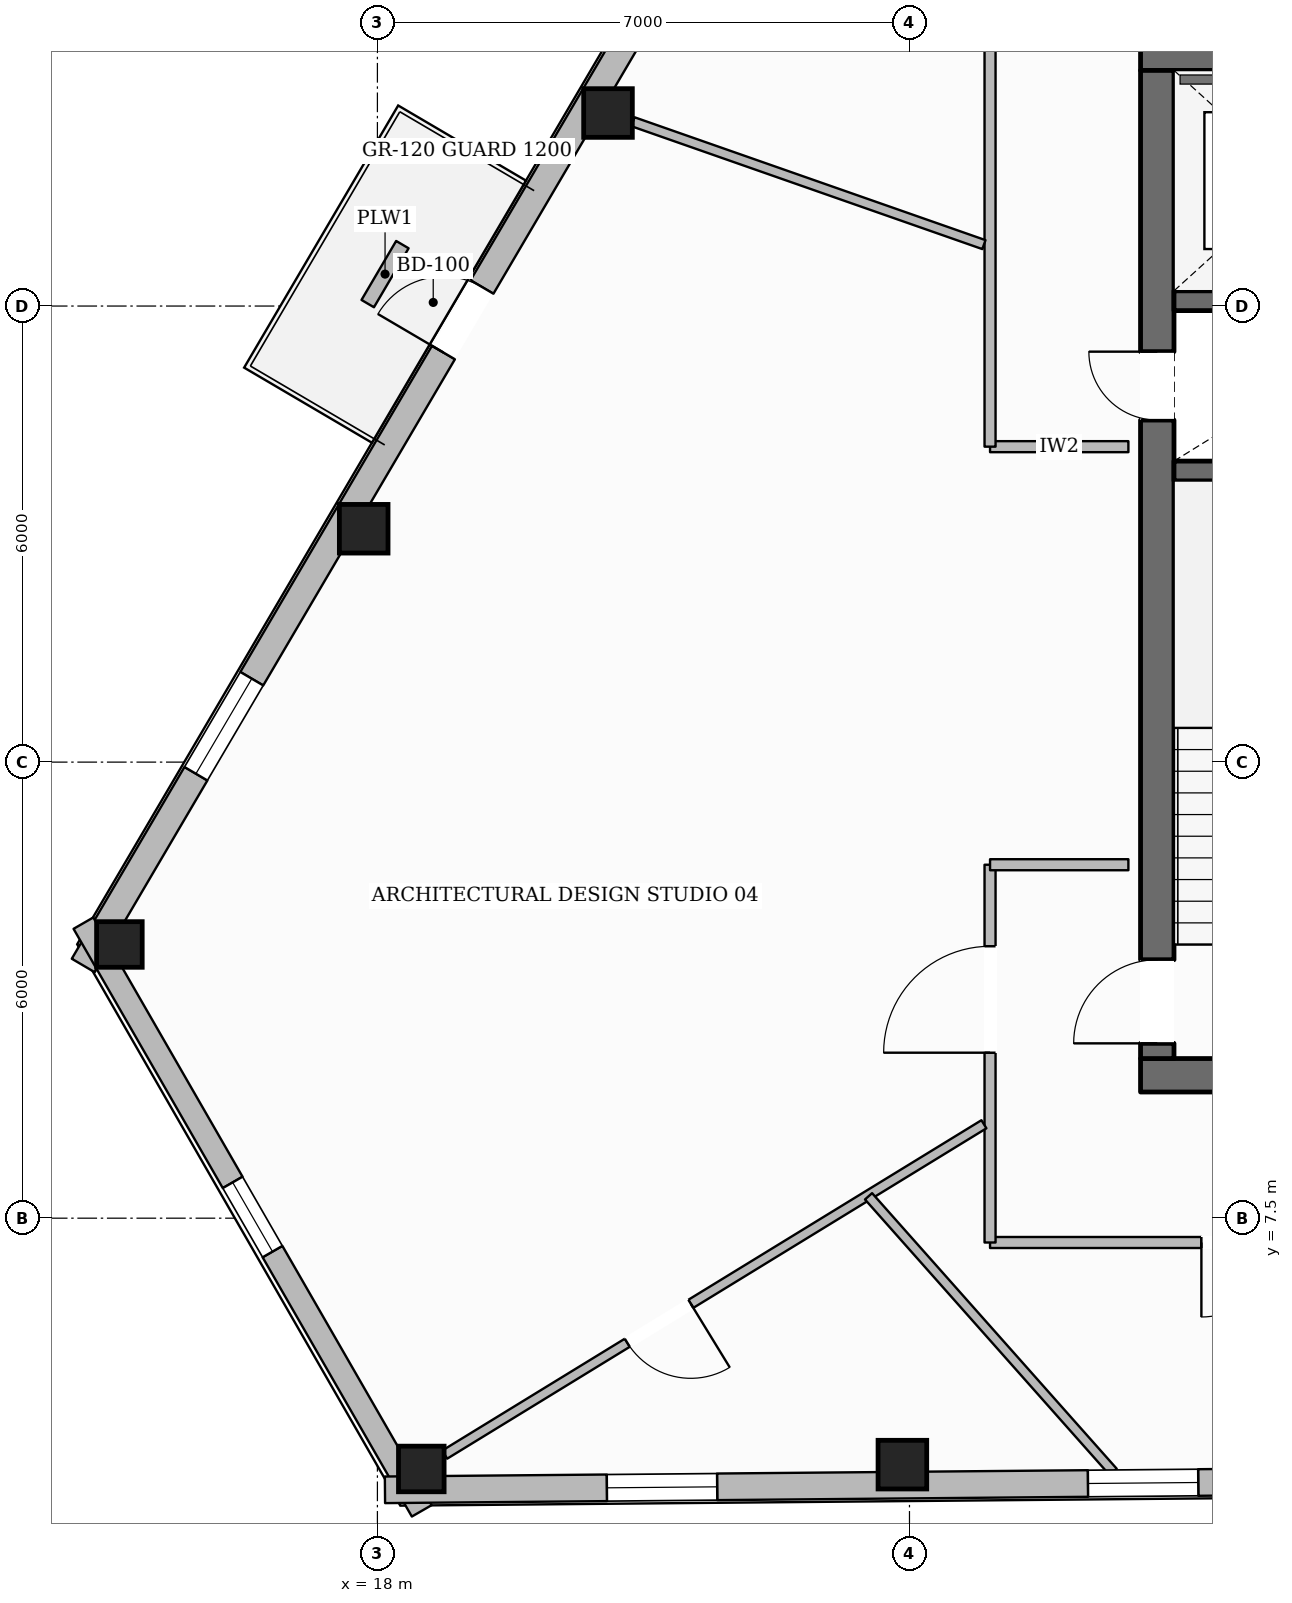
"""IFC4 building model, lengths in metres.
Left out: names, types, materials, properties, quantities, classifications, styles, units other than length and angle.
Written with IfcOpenShell. Run it as: python <this file> out.ifc"""

import sys

from ifc_helpers import new_model, si_unit, direction, frame, frame_2d, origin, origin_2d, place, context, subcontext, project, spatial, rectangle, hollow_rectangle, extrude, element, fill, save


model = new_model("IFC4")
c1 = context("Model", 3, precision=1e-05, world=origin(), true_north=direction((0.0, 1.0)))
c2 = subcontext(c1, "Body", "Model", "MODEL_VIEW")
j1 = project(units=[si_unit("LENGTHUNIT", "METRE"), si_unit("PLANEANGLEUNIT", "RADIAN")], contexts=[c1])
p1 = place(None, origin())
s1 = spatial("IfcSite", under=j1, at=p1, CompositionType="ELEMENT")
p2 = place(p1, origin())
s2 = spatial("IfcBuilding", under=s1, at=p2, CompositionType="ELEMENT")
p3 = place(p2, frame((0.0, 0.0, 215.05)))
s3 = spatial("IfcBuildingStorey", under=s2, at=p3, CompositionType="ELEMENT", Elevation=215.05)
p4 = place(p3, frame((28.04, 9.38, 0.0), z_axis=(0.0, 0.0, 1.0), x_axis=(1.0, 0.0, 0.0)))
e1 = element("IfcWall", 1, at=p4, inside=s3, PredefinedType="SOLIDWALL", context=c2, shape_type="SweptSolid", body=[
    extrude(rectangle(XDim=19.92, YDim=0.44, at=frame_2d((9.96, 0.0))), origin(), (0.0, 0.0, 1.0), 3.6),
])
p5 = place(p4, frame((10.46, 0.0, 0.0)))
e2 = element("IfcOpeningElement", 2, at=p5, cuts=e1, PredefinedType="OPENING", context=c2, shape_type="SweptSolid", body=[
    extrude(rectangle(XDim=1.4, YDim=2.2, at=frame_2d((0.7, 1.1))), frame((0.0, 0.23, 0.0), z_axis=(0.0, -1.0, 0.0), x_axis=(1.0, 0.0, 0.0)), (0.0, 0.0, 1.0), 0.46),
])
p6 = place(p3, frame((28.04, 22.82, 0.0), z_axis=(0.0, 0.0, 1.0), x_axis=(1.0, 0.0, 0.0)))
e3 = element("IfcWall", 3, at=p6, inside=s3, PredefinedType="SOLIDWALL", context=c2, shape_type="SweptSolid", body=[
    extrude(rectangle(XDim=19.92, YDim=0.44, at=frame_2d((9.96, 0.0))), origin(), (0.0, 0.0, 1.0), 3.6),
])
p7 = place(p6, frame((6.235, 0.0, 0.0)))
e4 = element("IfcOpeningElement", 4, at=p7, cuts=e3, PredefinedType="OPENING", context=c2, shape_type="SweptSolid", body=[
    extrude(rectangle(XDim=1.05, YDim=2.15, at=frame_2d((0.525, 1.075))), frame((0.0, 0.23, 0.0), z_axis=(0.0, -1.0, 0.0), x_axis=(1.0, 0.0, 0.0)), (0.0, 0.0, 1.0), 0.46),
])
p8 = place(p6, frame((12.635, 0.0, 0.0)))
e5 = element("IfcOpeningElement", 5, at=p8, cuts=e3, PredefinedType="OPENING", context=c2, shape_type="SweptSolid", body=[
    extrude(rectangle(XDim=1.05, YDim=2.15, at=frame_2d((0.525, 1.075))), frame((0.0, 0.23, 0.0), z_axis=(0.0, -1.0, 0.0), x_axis=(1.0, 0.0, 0.0)), (0.0, 0.0, 1.0), 0.46),
])
p9 = place(p3, frame((28.26, 9.6, 0.0), z_axis=(0.0, 0.0, 1.0), x_axis=(0.0, 1.0, 0.0)))
e6 = element("IfcWall", 6, at=p9, inside=s3, PredefinedType="SOLIDWALL", context=c2, shape_type="SweptSolid", body=[
    extrude(rectangle(XDim=13.0, YDim=0.44, at=frame_2d((6.5, 0.0))), origin(), (0.0, 0.0, 1.0), 3.6),
])
p10 = place(p9, frame((0.2, 0.0, 0.0)))
e7 = element("IfcOpeningElement", 7, at=p10, cuts=e6, PredefinedType="OPENING", context=c2, shape_type="SweptSolid", body=[
    extrude(rectangle(XDim=1.1, YDim=2.15, at=frame_2d((0.55, 1.075))), frame((0.0, 0.23, 0.0), z_axis=(0.0, -1.0, 0.0), x_axis=(1.0, 0.0, 0.0)), (0.0, 0.0, 1.0), 0.46),
])
p11 = place(p9, frame((8.4, 0.0, 0.0)))
e8 = element("IfcOpeningElement", 8, at=p11, cuts=e6, PredefinedType="OPENING", context=c2, shape_type="SweptSolid", body=[
    extrude(rectangle(XDim=0.9, YDim=2.1, at=frame_2d((0.45, 1.05))), frame((0.0, 0.23, 0.0), z_axis=(0.0, -1.0, 0.0), x_axis=(1.0, 0.0, 0.0)), (0.0, 0.0, 1.0), 0.46),
])
for number, where, z_axis, x_axis in (
    (9, (28.48, 17.33, 0.0), (0.0, 0.0, 1.0), (1.0, 0.0, 0.0)),
    (10, (28.48, 19.57, 0.0), (0.0, 0.0, 1.0), (1.0, 0.0, 0.0)),
):
    element("IfcWall", number, at=place(p3, frame(where, z_axis=z_axis, x_axis=x_axis)), inside=s3, PredefinedType="SHEAR", context=c2, shape_type="SweptSolid", body=[
        extrude(rectangle(XDim=3.2, YDim=0.26, at=frame_2d((1.6, 0.0))), origin(), (0.0, 0.0, 1.0), 3.6),
    ])
for number, where, z_axis, x_axis in (
    (11, (21.034, 22.04, 0.0), (0.0, 0.0, 1.0), (1.0, 0.0, 0.0)),
    (12, (17.82, 16.57, 0.0), (0.0, 0.0, 1.0), (1.0, 0.0, 0.0)),
):
    element("IfcColumn", number, at=place(p3, frame(where, z_axis=z_axis, x_axis=x_axis)), inside=s3, PredefinedType="COLUMN", context=c2, shape_type="SweptSolid", body=[
        extrude(hollow_rectangle(XDim=0.64, YDim=0.64, WallThickness=0.028, at=origin_2d()), origin(), (0.0, 0.0, 1.0), 3.6),
    ])
for number, where, z_axis, x_axis in (
    (13, (14.605, 11.101, 0.0), (0.0, 0.0, 1.0), (1.0, 0.0, 0.0)),
    (14, (18.577, 4.201, 0.0), (0.0, 0.0, 1.0), (1.0, 0.0, 0.0)),
):
    element("IfcColumn", number, at=place(p3, frame(where, z_axis=z_axis, x_axis=x_axis)), inside=s3, PredefinedType="COLUMN", context=c2, shape_type="SweptSolid", body=[
        extrude(hollow_rectangle(XDim=0.6, YDim=0.6, WallThickness=0.028, at=origin_2d()), origin(), (0.0, 0.0, 1.0), 3.6),
    ])
p12 = place(p3, frame((24.907, 4.258, 0.0), z_axis=(0.0, 0.0, 1.0), x_axis=(1.0, 0.0, 0.0)))
e15 = element("IfcColumn", 15, at=p12, inside=s3, PredefinedType="COLUMN", context=c2, shape_type="SweptSolid", body=[
    extrude(hollow_rectangle(XDim=0.64, YDim=0.64, WallThickness=0.028, at=origin_2d()), origin(), (0.0, 0.0, 1.0), 3.6),
])
p13 = place(p3, frame((14.13, 10.825, 0.0), z_axis=(0.0, 0.0, 1.0), x_axis=(0.506658543763, 0.862146808863, 0.0)))
e16 = element("IfcWall", 16, at=p13, inside=s3, PredefinedType="STANDARD", context=c2, shape_type="SweptSolid", body=[
    extrude(rectangle(XDim=39.014, YDim=0.35, at=frame_2d((19.507, 0.0))), origin(), (0.0, 0.0, 1.0), 3.132),
])
p14 = place(p13, frame((9.354, 0.0, 0.0)))
e17 = element("IfcOpeningElement", 17, at=p14, cuts=e16, PredefinedType="OPENING", context=c2, shape_type="SweptSolid", body=[
    extrude(rectangle(XDim=1.0, YDim=2.2, at=frame_2d((0.5, 1.1))), frame((0.0, 0.185, 0.0), z_axis=(0.0, -1.0, 0.0), x_axis=(1.0, 0.0, 0.0)), (0.0, 0.0, 1.0), 0.37),
])
p15 = place(p13, frame((34.645, 0.0, 0.65)))
e18 = element("IfcOpeningElement", 18, at=p15, cuts=e16, PredefinedType="OPENING", context=c2, shape_type="SweptSolid", body=[
    extrude(rectangle(XDim=1.45, YDim=1.75, at=frame_2d((0.725, 0.875))), frame((0.0, 0.185, 0.0), z_axis=(0.0, -1.0, 0.0), x_axis=(1.0, 0.0, 0.0)), (0.0, 0.0, 1.0), 0.37),
])
p16 = place(p13, frame((28.301, 0.0, 0.65)))
e19 = element("IfcOpeningElement", 19, at=p16, cuts=e16, PredefinedType="OPENING", context=c2, shape_type="SweptSolid", body=[
    extrude(rectangle(XDim=1.45, YDim=1.75, at=frame_2d((0.725, 0.875))), frame((0.0, 0.185, 0.0), z_axis=(0.0, -1.0, 0.0), x_axis=(1.0, 0.0, 0.0)), (0.0, 0.0, 1.0), 0.37),
])
p17 = place(p13, frame((21.958, 0.0, 0.65)))
e20 = element("IfcOpeningElement", 20, at=p17, cuts=e16, PredefinedType="OPENING", context=c2, shape_type="SweptSolid", body=[
    extrude(rectangle(XDim=1.45, YDim=1.75, at=frame_2d((0.725, 0.875))), frame((0.0, 0.185, 0.0), z_axis=(0.0, -1.0, 0.0), x_axis=(1.0, 0.0, 0.0)), (0.0, 0.0, 1.0), 0.37),
])
p18 = place(p13, frame((2.926, 0.0, 0.65)))
e21 = element("IfcOpeningElement", 21, at=p18, cuts=e16, PredefinedType="OPENING", context=c2, shape_type="SweptSolid", body=[
    extrude(rectangle(XDim=1.45, YDim=1.75, at=frame_2d((0.725, 0.875))), frame((0.0, 0.185, 0.0), z_axis=(0.0, -1.0, 0.0), x_axis=(1.0, 0.0, 0.0)), (0.0, 0.0, 1.0), 0.37),
])
p19 = place(p3, frame((18.583, 3.65, 0.0), z_axis=(0.0, 0.0, 1.0), x_axis=(-0.498897804032, 0.866660822428, 0.0)))
e22 = element("IfcWall", 22, at=p19, inside=s3, PredefinedType="STANDARD", context=c2, shape_type="SweptSolid", body=[
    extrude(rectangle(XDim=8.922, YDim=0.3, at=frame_2d((4.461, 0.0))), origin(), (0.0, 0.0, 1.0), 3.132),
])
p20 = place(p19, frame((3.936, 0.0, 0.65)))
e23 = element("IfcOpeningElement", 23, at=p20, cuts=e22, PredefinedType="OPENING", context=c2, shape_type="SweptSolid", body=[
    extrude(rectangle(XDim=1.05, YDim=1.7, at=frame_2d((0.525, 0.85))), frame((0.0, 0.16, 0.0), z_axis=(0.0, -1.0, 0.0), x_axis=(1.0, 0.0, 0.0)), (0.0, 0.0, 1.0), 0.32),
])
p21 = place(p3, frame((57.027, 4.277, 0.0), z_axis=(0.0, 0.0, 1.0), x_axis=(-0.999959560683, -0.008993163978, 0.0)))
e24 = element("IfcWall", 24, at=p21, inside=s3, PredefinedType="STANDARD", context=c2, shape_type="SweptSolid", body=[
    extrude(rectangle(XDim=38.929, YDim=0.35, at=frame_2d((19.465, 0.0))), origin(), (0.0, 0.0, 1.0), 3.132),
])
p22 = place(p21, frame((9.332, 0.0, 0.0)))
e25 = element("IfcOpeningElement", 25, at=p22, cuts=e24, PredefinedType="OPENING", context=c2, shape_type="SweptSolid", body=[
    extrude(rectangle(XDim=1.0, YDim=2.2, at=frame_2d((0.5, 1.1))), frame((0.0, 0.185, 0.0), z_axis=(0.0, -1.0, 0.0), x_axis=(1.0, 0.0, 0.0)), (0.0, 0.0, 1.0), 0.37),
])
p23 = place(p21, frame((34.559, 0.0, 0.65)))
e26 = element("IfcOpeningElement", 26, at=p23, cuts=e24, PredefinedType="OPENING", context=c2, shape_type="SweptSolid", body=[
    extrude(rectangle(XDim=1.45, YDim=1.75, at=frame_2d((0.725, 0.875))), frame((0.0, 0.185, 0.0), z_axis=(0.0, -1.0, 0.0), x_axis=(1.0, 0.0, 0.0)), (0.0, 0.0, 1.0), 0.37),
])
p24 = place(p21, frame((28.229, 0.0, 0.65)))
e27 = element("IfcOpeningElement", 27, at=p24, cuts=e24, PredefinedType="OPENING", context=c2, shape_type="SweptSolid", body=[
    extrude(rectangle(XDim=1.45, YDim=1.75, at=frame_2d((0.725, 0.875))), frame((0.0, 0.185, 0.0), z_axis=(0.0, -1.0, 0.0), x_axis=(1.0, 0.0, 0.0)), (0.0, 0.0, 1.0), 0.37),
])
p25 = place(p21, frame((21.9, 0.0, 0.65)))
e28 = element("IfcOpeningElement", 28, at=p25, cuts=e24, PredefinedType="OPENING", context=c2, shape_type="SweptSolid", body=[
    extrude(rectangle(XDim=1.45, YDim=1.75, at=frame_2d((0.725, 0.875))), frame((0.0, 0.185, 0.0), z_axis=(0.0, -1.0, 0.0), x_axis=(1.0, 0.0, 0.0)), (0.0, 0.0, 1.0), 0.37),
])
p26 = place(p21, frame((2.912, 0.0, 0.65)))
e29 = element("IfcOpeningElement", 29, at=p26, cuts=e24, PredefinedType="OPENING", context=c2, shape_type="SweptSolid", body=[
    extrude(rectangle(XDim=1.45, YDim=1.75, at=frame_2d((0.725, 0.875))), frame((0.0, 0.185, 0.0), z_axis=(0.0, -1.0, 0.0), x_axis=(1.0, 0.0, 0.0)), (0.0, 0.0, 1.0), 0.37),
])
p27 = place(p3, frame((18.329, 20.308, 0.0), z_axis=(0.0, 0.0, 1.0), x_axis=(-0.506617093274, -0.862171166766, 0.0)))
e30 = element("IfcWall", 30, at=p27, inside=s3, PredefinedType="USERDEFINED", context=c2, shape_type="SweptSolid", body=[
    extrude(rectangle(XDim=0.9, YDim=0.19, at=frame_2d((0.45, 0.0))), origin(), (0.0, 0.0, 1.0), 0.5),
])
p28 = place(p3, frame((27.88, 17.65, 0.0), z_axis=(0.0, 0.0, 1.0), x_axis=(-1.0, 0.0, 0.0)))
e31 = element("IfcWall", 31, at=p28, inside=s3, PredefinedType="PARTITIONING", context=c2, shape_type="SweptSolid", body=[
    extrude(rectangle(XDim=1.82, YDim=0.145, at=frame_2d((0.91, 0.0))), origin(), (0.0, 0.0, 1.0), 3.6),
])
p29 = place(p3, frame((26.06, 17.65, 0.0), z_axis=(0.0, 0.0, 1.0), x_axis=(0.0, 1.0, 0.0)))
e32 = element("IfcWall", 32, at=p29, inside=s3, PredefinedType="PARTITIONING", context=c2, shape_type="SweptSolid", body=[
    extrude(rectangle(XDim=7.37, YDim=0.145, at=frame_2d((3.685, 0.0))), origin(), (0.0, 0.0, 1.0), 3.339),
])
p30 = place(p3, frame((49.94, 7.18, 0.0), z_axis=(0.0, 0.0, 1.0), x_axis=(-1.0, 0.0, 0.0)))
e33 = element("IfcWall", 33, at=p30, inside=s3, PredefinedType="PARTITIONING", context=c2, shape_type="SweptSolid", body=[
    extrude(rectangle(XDim=23.88, YDim=0.145, at=frame_2d((11.94, 0.0))), origin(), (0.0, 0.0, 1.0), 3.6),
])
p31 = place(p30, frame((20.119, 0.0, 0.0)))
e34 = element("IfcOpeningElement", 34, at=p31, cuts=e33, PredefinedType="OPENING", context=c2, shape_type="SweptSolid", body=[
    extrude(rectangle(XDim=0.98, YDim=2.15, at=frame_2d((0.49, 1.075))), frame((0.0, 0.083, 0.0), z_axis=(0.0, -1.0, 0.0), x_axis=(1.0, 0.0, 0.0)), (0.0, 0.0, 1.0), 0.165),
])
p32 = place(p30, frame((12.179, 0.0, 0.0)))
e35 = element("IfcOpeningElement", 35, at=p32, cuts=e33, PredefinedType="OPENING", context=c2, shape_type="SweptSolid", body=[
    extrude(rectangle(XDim=0.98, YDim=2.15, at=frame_2d((0.49, 1.075))), frame((0.0, 0.083, 0.0), z_axis=(0.0, -1.0, 0.0), x_axis=(1.0, 0.0, 0.0)), (0.0, 0.0, 1.0), 0.165),
])
p33 = place(p30, frame((4.392, 0.0, 0.0)))
e36 = element("IfcOpeningElement", 36, at=p33, cuts=e33, PredefinedType="OPENING", context=c2, shape_type="SweptSolid", body=[
    extrude(rectangle(XDim=0.98, YDim=2.15, at=frame_2d((0.49, 1.075))), frame((0.0, 0.083, 0.0), z_axis=(0.0, -1.0, 0.0), x_axis=(1.0, 0.0, 0.0)), (0.0, 0.0, 1.0), 0.165),
])
p34 = place(p3, frame((26.06, 7.18, 0.0), z_axis=(0.0, 0.0, 1.0), x_axis=(0.0, 1.0, 0.0)))
e37 = element("IfcWall", 37, at=p34, inside=s3, PredefinedType="PARTITIONING", context=c2, shape_type="SweptSolid", body=[
    extrude(rectangle(XDim=4.97, YDim=0.145, at=frame_2d((2.485, 0.0))), origin(), (0.0, 0.0, 1.0), 3.6),
])
p35 = place(p34, frame((2.497, 0.0, 0.0)))
e38 = element("IfcOpeningElement", 38, at=p35, cuts=e37, PredefinedType="OPENING", context=c2, shape_type="SweptSolid", body=[
    extrude(rectangle(XDim=1.4, YDim=2.2, at=frame_2d((0.7, 1.1))), frame((0.0, 0.083, 0.0), z_axis=(0.0, -1.0, 0.0), x_axis=(1.0, 0.0, 0.0)), (0.0, 0.0, 1.0), 0.165),
])
p36 = place(p3, frame((26.06, 12.15, 0.0), z_axis=(0.0, 0.0, 1.0), x_axis=(1.0, 0.0, 0.0)))
e39 = element("IfcWall", 39, at=p36, inside=s3, PredefinedType="PARTITIONING", context=c2, shape_type="SweptSolid", body=[
    extrude(rectangle(XDim=1.82, YDim=0.145, at=frame_2d((0.91, 0.0))), origin(), (0.0, 0.0, 1.0), 3.6),
])
p37 = place(p3, frame((25.979, 20.308, 0.0), z_axis=(0.0, 0.0, 1.0), x_axis=(-0.943825677216, 0.330443778922, 0.0)))
e40 = element("IfcWall", 40, at=p37, inside=s3, PredefinedType="PARTITIONING", context=c2, shape_type="SweptSolid", body=[
    extrude(rectangle(XDim=4.893, YDim=0.125, at=frame_2d((2.446, 0.0))), origin(), (0.0, 0.0, 1.0), 3.6),
])
p38 = place(p3, frame((25.979, 8.736, 0.0), z_axis=(0.0, 0.0, 1.0), x_axis=(-0.852694447683, -0.522409972043, 0.0)))
e41 = element("IfcWall", 41, at=p38, inside=s3, PredefinedType="PARTITIONING", context=c2, shape_type="SweptSolid", body=[
    extrude(rectangle(XDim=8.32, YDim=0.125, at=frame_2d((4.16, 0.0))), origin(), (0.0, 0.0, 1.0), 3.141),
])
p39 = place(p38, frame((4.522, 0.0, 0.0)))
e42 = element("IfcOpeningElement", 42, at=p39, cuts=e41, PredefinedType="OPENING", context=c2, shape_type="SweptSolid", body=[
    extrude(rectangle(XDim=0.98, YDim=2.15, at=frame_2d((0.49, 1.075))), frame((0.0, 0.073, 0.0), z_axis=(0.0, -1.0, 0.0), x_axis=(1.0, 0.0, 0.0)), (0.0, 0.0, 1.0), 0.145),
])
p40 = place(p3, frame((24.461, 7.788, 0.0), z_axis=(0.0, 0.0, 1.0), x_axis=(0.663882302214, -0.747837073705, 0.0)))
e43 = element("IfcWall", 43, at=p40, inside=s3, PredefinedType="PARTITIONING", context=c2, shape_type="SweptSolid", body=[
    extrude(rectangle(XDim=4.848, YDim=0.125, at=frame_2d((2.424, 0.0))), origin(), (0.0, 0.0, 1.0), 3.6),
])
p41 = place(p14, origin())
e44 = element("IfcDoor", 44, at=p41, inside=s3, OperationType="SINGLE_SWING_LEFT", PredefinedType="DOOR", context=c2, shape_type="SweptSolid", body=[
    extrude(rectangle(XDim=1.0, YDim=2.2, at=frame_2d((0.5, 1.1))), frame((0.0, 0.025, 0.0), z_axis=(0.0, -1.0, 0.0), x_axis=(1.0, 0.0, 0.0)), (0.0, 0.0, 1.0), 0.05),
])
fill(e17, e44)
p42 = place(p18, origin())
e45 = element("IfcWindow", 45, at=p42, inside=s3, PartitioningType="SINGLE_PANEL", PredefinedType="WINDOW", context=c2, shape_type="SweptSolid", body=[
    extrude(rectangle(XDim=1.45, YDim=1.75, at=frame_2d((0.725, 0.875))), frame((0.0, 0.03, 0.0), z_axis=(0.0, -1.0, 0.0), x_axis=(1.0, 0.0, 0.0)), (0.0, 0.0, 1.0), 0.06),
])
fill(e21, e45)
p43 = place(p23, origin())
e46 = element("IfcWindow", 46, at=p43, inside=s3, PartitioningType="SINGLE_PANEL", PredefinedType="WINDOW", context=c2, shape_type="SweptSolid", body=[
    extrude(rectangle(XDim=1.45, YDim=1.75, at=frame_2d((0.725, 0.875))), frame((0.0, 0.03, 0.0), z_axis=(0.0, -1.0, 0.0), x_axis=(1.0, 0.0, 0.0)), (0.0, 0.0, 1.0), 0.06),
])
fill(e26, e46)
p44 = place(p24, origin())
e47 = element("IfcWindow", 47, at=p44, inside=s3, PartitioningType="SINGLE_PANEL", PredefinedType="WINDOW", context=c2, shape_type="SweptSolid", body=[
    extrude(rectangle(XDim=1.45, YDim=1.75, at=frame_2d((0.725, 0.875))), frame((0.0, 0.03, 0.0), z_axis=(0.0, -1.0, 0.0), x_axis=(1.0, 0.0, 0.0)), (0.0, 0.0, 1.0), 0.06),
])
fill(e27, e47)
p45 = place(p20, origin())
e48 = element("IfcWindow", 48, at=p45, inside=s3, PartitioningType="SINGLE_PANEL", PredefinedType="WINDOW", context=c2, shape_type="SweptSolid", body=[
    extrude(rectangle(XDim=1.05, YDim=1.7, at=frame_2d((0.525, 0.85))), frame((0.0, 0.03, 0.0), z_axis=(0.0, -1.0, 0.0), x_axis=(1.0, 0.0, 0.0)), (0.0, 0.0, 1.0), 0.06),
])
fill(e23, e48)
p46 = place(p10, origin())
e49 = element("IfcDoor", 49, at=p46, inside=s3, OperationType="SINGLE_SWING_LEFT", PredefinedType="DOOR", context=c2, shape_type="SweptSolid", body=[
    extrude(rectangle(XDim=1.1, YDim=2.15, at=frame_2d((0.55, 1.075))), frame((0.0, 0.025, 0.0), z_axis=(0.0, -1.0, 0.0), x_axis=(1.0, 0.0, 0.0)), (0.0, 0.0, 1.0), 0.05),
])
fill(e7, e49)
p47 = place(p11, origin())
e50 = element("IfcDoor", 50, at=p47, inside=s3, OperationType="SINGLE_SWING_RIGHT", PredefinedType="DOOR", context=c2, shape_type="SweptSolid", body=[
    extrude(rectangle(XDim=0.9, YDim=2.1, at=frame_2d((0.45, 1.05))), frame((0.0, 0.025, 0.0), z_axis=(0.0, -1.0, 0.0), x_axis=(1.0, 0.0, 0.0)), (0.0, 0.0, 1.0), 0.05),
])
fill(e8, e50)
p48 = place(p35, origin())
e51 = element("IfcDoor", 51, at=p48, inside=s3, OperationType="SINGLE_SWING_LEFT", PredefinedType="DOOR", context=c2, shape_type="SweptSolid", body=[
    extrude(rectangle(XDim=1.4, YDim=2.2, at=frame_2d((0.7, 1.1))), frame((0.0, 0.025, 0.0), z_axis=(0.0, -1.0, 0.0), x_axis=(1.0, 0.0, 0.0)), (0.0, 0.0, 1.0), 0.05),
])
fill(e38, e51)
p49 = place(p31, origin())
e52 = element("IfcDoor", 52, at=p49, inside=s3, OperationType="SINGLE_SWING_RIGHT", PredefinedType="DOOR", context=c2, shape_type="SweptSolid", body=[
    extrude(rectangle(XDim=0.98, YDim=2.15, at=frame_2d((0.49, 1.075))), frame((0.0, 0.025, 0.0), z_axis=(0.0, -1.0, 0.0), x_axis=(1.0, 0.0, 0.0)), (0.0, 0.0, 1.0), 0.05),
])
fill(e34, e52)
p50 = place(p39, origin())
e53 = element("IfcDoor", 53, at=p50, inside=s3, OperationType="SINGLE_SWING_LEFT", PredefinedType="DOOR", context=c2, shape_type="SweptSolid", body=[
    extrude(rectangle(XDim=0.98, YDim=2.15, at=frame_2d((0.49, 1.075))), frame((0.0, 0.025, 0.0), z_axis=(0.0, -1.0, 0.0), x_axis=(1.0, 0.0, 0.0)), (0.0, 0.0, 1.0), 0.05),
])
fill(e42, e53)
save(model, sys.argv[1])
